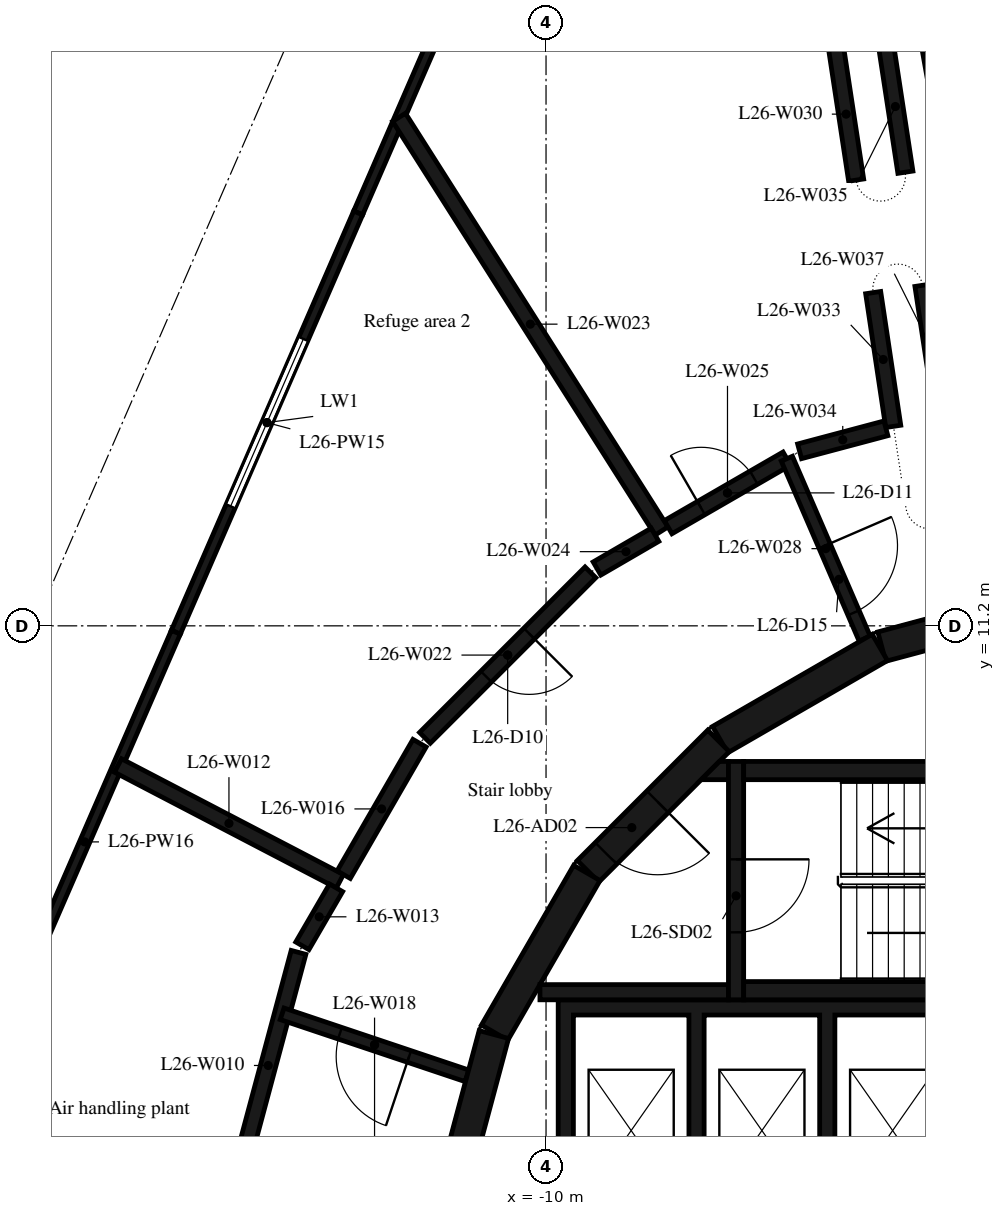
"""IFC4 building model, lengths in metres.
Left out: names, types, materials, properties, quantities, classifications, styles, units other than length and angle.
Written with IfcOpenShell. Run it as: python <this file> out.ifc"""

import sys

from ifc_helpers import new_model, si_unit, direction, frame, frame_2d, origin, place, context, subcontext, project, spatial, polyline, rectangle, outline, extrude, element, fill, save


model = new_model("IFC4")
c1 = context("Model", 3, precision=1e-05, world=origin(), true_north=direction((0.0, 1.0)))
c2 = subcontext(c1, "Body", "Model", "MODEL_VIEW")
j1 = project(units=[si_unit("LENGTHUNIT", "METRE"), si_unit("PLANEANGLEUNIT", "RADIAN")], contexts=[c1])
p1 = place(None, origin())
s1 = spatial("IfcSite", under=j1, at=p1, CompositionType="ELEMENT")
p2 = place(p1, origin())
s2 = spatial("IfcBuilding", under=s1, at=p2, CompositionType="ELEMENT")
p3 = place(p2, frame((0.0, 0.0, 108.2)))
s3 = spatial("IfcBuildingStorey", under=s2, at=p3, CompositionType="ELEMENT", Elevation=108.2)
p4 = place(p3, frame((-10.092, 24.885, 0.0), z_axis=(0.0, 0.0, 1.0), x_axis=(-0.398765291981, -0.917053020229, 0.0)))
e1 = element("IfcWall", 1, at=p4, inside=s3, PredefinedType="STANDARD", context=c2, shape_type="SweptSolid", body=[
    extrude(rectangle(XDim=7.519, YDim=0.16, at=frame_2d((3.76, 0.0))), origin(), (0.0, 0.0, 1.0), 4.75),
])
p5 = place(p4, frame((1.558, 0.0, 1.0)))
e2 = element("IfcOpeningElement", 2, at=p5, cuts=e1, PredefinedType="OPENING", context=c2, shape_type="SweptSolid", body=[
    extrude(rectangle(XDim=3.0, YDim=2.2, at=frame_2d((1.5, 1.1))), frame((0.0, 0.09, 0.0), z_axis=(0.0, -1.0, 0.0), x_axis=(1.0, 0.0, 0.0)), (0.0, 0.0, 1.0), 0.18),
])
p6 = place(p3, frame((-13.09, 17.99, 0.0), z_axis=(0.0, 0.0, 1.0), x_axis=(-0.398749858314, -0.917059731149, 0.0)))
e3 = element("IfcWall", 3, at=p6, inside=s3, PredefinedType="STANDARD", context=c2, shape_type="SweptSolid", body=[
    extrude(rectangle(XDim=7.519, YDim=0.16, at=frame_2d((3.759, 0.0))), origin(), (0.0, 0.0, 1.0), 4.75),
])
p7 = place(p6, frame((2.26, 0.0, 1.0)))
e4 = element("IfcOpeningElement", 4, at=p7, cuts=e3, PredefinedType="OPENING", context=c2, shape_type="SweptSolid", body=[
    extrude(rectangle(XDim=3.0, YDim=2.2, at=frame_2d((1.5, 1.1))), frame((0.0, 0.09, 0.0), z_axis=(0.0, -1.0, 0.0), x_axis=(1.0, 0.0, 0.0)), (0.0, 0.0, 1.0), 0.18),
])
p8 = place(p3, frame((-16.088, 11.095, 0.0), z_axis=(0.0, 0.0, 1.0), x_axis=(-0.398737984544, -0.917064893932, 0.0)))
e5 = element("IfcWall", 5, at=p8, inside=s3, PredefinedType="STANDARD", context=c2, shape_type="SweptSolid", body=[
    extrude(rectangle(XDim=7.519, YDim=0.16, at=frame_2d((3.759, 0.0))), origin(), (0.0, 0.0, 1.0), 4.75),
])
for number, where, z_axis, x_axis in (
    (6, (-1.55, 11.643, 0.0), (0.0, 0.0, 1.0), (-0.966, -0.259, 0.0)),
    (7, (-4.51, 10.845, 0.0), (0.0, 0.0, 1.0), (-0.866, -0.5, 0.0)),
):
    element("IfcWall", number, at=place(p3, frame(where, z_axis=z_axis, x_axis=x_axis)), inside=s3, PredefinedType="SHEAR", context=c2, shape_type="SweptSolid", body=[
        extrude(rectangle(XDim=3.033, YDim=0.5, at=frame_2d((1.516, 0.0))), origin(), (0.0, 0.0, 1.0), 4.75),
    ])
p9 = place(p3, frame((-7.164, 9.308, 0.0), z_axis=(0.0, 0.0, 1.0), x_axis=(-0.707106781187, -0.707106781187, 0.0)))
e8 = element("IfcWall", 8, at=p9, inside=s3, PredefinedType="SHEAR", context=c2, shape_type="SweptSolid", body=[
    extrude(rectangle(XDim=3.032, YDim=0.5, at=frame_2d((1.516, 0.0))), origin(), (0.0, 0.0, 1.0), 4.75),
])
p10 = place(p9, frame((1.416, 0.0, 0.0)))
e9 = element("IfcOpeningElement", 9, at=p10, cuts=e8, PredefinedType="OPENING", context=c2, shape_type="SweptSolid", body=[
    extrude(rectangle(XDim=1.2, YDim=2.1, at=frame_2d((0.6, 1.05))), frame((0.0, 0.26, 0.0), z_axis=(0.0, -1.0, 0.0), x_axis=(1.0, 0.0, 0.0)), (0.0, 0.0, 1.0), 0.52),
])
for number, where, z_axis, x_axis in (
    (10, (-9.329, 7.137, 0.0), (0.0, 0.0, 1.0), (-0.5, -0.866, 0.0)),
    (11, (-10.858, 4.479, 0.0), (0.0, 0.0, 1.0), (-0.259, -0.966, 0.0)),
):
    element("IfcWall", number, at=place(p3, frame(where, z_axis=z_axis, x_axis=x_axis)), inside=s3, PredefinedType="SHEAR", context=c2, shape_type="SweptSolid", body=[
        extrude(rectangle(XDim=3.033, YDim=0.5, at=frame_2d((1.516, 0.0))), origin(), (0.0, 0.0, 1.0), 4.75),
    ])
for number, where, z_axis, x_axis in (
    (12, (-6.75, 5.2, 0.0), (0.0, 0.0, 1.0), (1.0, 0.0, 0.0)),
    (13, (-6.75, 8.82, 0.0), (0.0, 0.0, 1.0), (1.0, 0.0, 0.0)),
):
    element("IfcWall", number, at=place(p3, frame(where, z_axis=z_axis, x_axis=x_axis)), inside=s3, PredefinedType="SHEAR", context=c2, shape_type="SweptSolid", body=[
        extrude(rectangle(XDim=6.75, YDim=0.3, at=frame_2d((3.375, 0.0))), origin(), (0.0, 0.0, 1.0), 4.75),
    ])
p11 = place(p3, frame((-6.875, 8.97, 0.0), z_axis=(0.0, 0.0, 1.0), x_axis=(0.0, -1.0, 0.0)))
e14 = element("IfcWall", 14, at=p11, inside=s3, PredefinedType="SHEAR", context=c2, shape_type="SweptSolid", body=[
    extrude(rectangle(XDim=3.92, YDim=0.25, at=frame_2d((1.96, 0.0))), origin(), (0.0, 0.0, 1.0), 4.75),
])
p12 = place(p11, frame((1.61, 0.0, 0.0)))
e15 = element("IfcOpeningElement", 15, at=p12, cuts=e14, PredefinedType="OPENING", context=c2, shape_type="SweptSolid", body=[
    extrude(rectangle(XDim=1.2, YDim=2.1, at=frame_2d((0.6, 1.05))), frame((0.0, 0.135, 0.0), z_axis=(0.0, -1.0, 0.0), x_axis=(1.0, 0.0, 0.0)), (0.0, 0.0, 1.0), 0.27),
])
p13 = place(p3, frame((-7.0, 5.175, 0.0), z_axis=(0.0, 0.0, 1.0), x_axis=(-1.0, 0.0, 0.0)))
e16 = element("IfcWall", 16, at=p13, inside=s3, PredefinedType="SHEAR", context=c2, shape_type="SweptSolid", body=[
    extrude(rectangle(XDim=3.1, YDim=0.25, at=frame_2d((1.55, 0.0))), origin(), (0.0, 0.0, 1.0), 4.75),
])
p14 = place(p3, origin())
e17 = element("IfcWall", 17, at=p14, inside=s3, PredefinedType="SHEAR", context=c2, shape_type="SweptSolid", body=[
    extrude(outline(polyline([(-7.148, 8.97), (-7.0, 8.97), (-7.0, 8.67), (-7.448, 8.67), (-7.148, 8.97)])), origin(), (0.0, 0.0, 1.0), 4.75),
])
p15 = place(p3, origin())
e18 = element("IfcWall", 18, at=p15, inside=s3, PredefinedType="SHEAR", context=c2, shape_type="SweptSolid", body=[
    extrude(outline(polyline([(-9.55, 4.8), (-7.65, 4.8), (-7.65, 1.9), (-7.4, 1.9), (-7.4, 4.8), (-5.5, 4.8), (-5.5, 1.9), (-5.25, 1.9), (-5.25, 4.8), (-3.35, 4.8), (-3.35, 1.9), (-3.1, 1.9), (-3.1, 4.8), (-1.2, 4.8), (-1.2, 1.9), (-0.95, 1.9), (-0.95, 4.8), (3.1, 4.8), (3.1, 1.9), (3.35, 1.9), (3.35, 4.8), (5.25, 4.8), (5.25, 1.9), (5.5, 1.9), (5.5, 4.8), (7.4, 4.8), (7.4, 1.9), (7.65, 1.9), (7.65, 4.8), (9.55, 4.8), (9.55, 1.9), (9.8, 1.9), (9.8, 4.8), (9.8, 5.05), (-9.8, 5.05), (-9.8, 4.8), (-9.8, 1.9), (-9.55, 1.9), (-9.55, 4.8)])), origin(), (0.0, 0.0, 1.0), 4.75),
])
p16 = place(p3, frame((-14.07, 5.83, 0.0), z_axis=(0.0, 0.0, 1.0), x_axis=(-0.259059323171, -0.965861411942, 0.0)))
e19 = element("IfcWall", 19, at=p16, inside=s3, PredefinedType="PARTITIONING", context=c2, shape_type="SweptSolid", body=[
    extrude(rectangle(XDim=3.851, YDim=0.25, at=frame_2d((1.925, 0.0))), origin(), (0.0, 0.0, 1.0), 4.75),
])
p17 = place(p3, frame((-13.39, 7.0, 0.0), z_axis=(0.0, 0.0, 1.0), x_axis=(-0.886668392091, 0.462405841731, 0.0)))
e20 = element("IfcWall", 20, at=p17, inside=s3, PredefinedType="PARTITIONING", context=c2, shape_type="SweptSolid", body=[
    extrude(rectangle(XDim=4.115, YDim=0.25, at=frame_2d((2.058, 0.0))), origin(), (0.0, 0.0, 1.0), 4.75),
])
p18 = place(p3, frame((-13.453, 6.892, 0.0), z_axis=(0.0, 0.0, 1.0), x_axis=(-0.502370413152, -0.864652512857, 0.0)))
e21 = element("IfcWall", 21, at=p18, inside=s3, PredefinedType="PARTITIONING", context=c2, shape_type="SweptSolid", body=[
    extrude(rectangle(XDim=1.103, YDim=0.25, at=frame_2d((0.552, 0.0))), origin(), (0.0, 0.0, 1.0), 4.75),
])
p19 = place(p3, frame((-12.08, 9.27, 0.0), z_axis=(0.0, 0.0, 1.0), x_axis=(-0.499821239653, -0.866128586522, 0.0)))
e22 = element("IfcWall", 22, at=p19, inside=s3, PredefinedType="PARTITIONING", context=c2, shape_type="SweptSolid", body=[
    extrude(rectangle(XDim=2.496, YDim=0.25, at=frame_2d((1.248, 0.0))), origin(), (0.0, 0.0, 1.0), 4.75),
])
p20 = place(p3, frame((-11.3, 3.8, 0.0), z_axis=(0.0, 0.0, 1.0), x_axis=(-0.94805712629, 0.318100118345, 0.0)))
e23 = element("IfcWall", 23, at=p20, inside=s3, PredefinedType="PARTITIONING", context=c2, shape_type="SweptSolid", body=[
    extrude(rectangle(XDim=3.207, YDim=0.2, at=frame_2d((1.603, 0.0))), origin(), (0.0, 0.0, 1.0), 4.75),
])
p21 = place(p20, frame((1.003, 0.0, 0.0)))
e24 = element("IfcOpeningElement", 24, at=p21, cuts=e23, PredefinedType="OPENING", context=c2, shape_type="SweptSolid", body=[
    extrude(rectangle(XDim=1.2, YDim=2.1, at=frame_2d((0.6, 1.05))), frame((0.0, 0.11, 0.0), z_axis=(0.0, -1.0, 0.0), x_axis=(1.0, 0.0, 0.0)), (0.0, 0.0, 1.0), 0.22),
])
p22 = place(p3, frame((-9.27, 12.08, 0.0), z_axis=(0.0, 0.0, 1.0), x_axis=(-0.707106781187, -0.707106781187, 0.0)))
e25 = element("IfcWall", 25, at=p22, inside=s3, PredefinedType="PARTITIONING", context=c2, shape_type="SweptSolid", body=[
    extrude(rectangle(XDim=3.849, YDim=0.25, at=frame_2d((1.925, 0.0))), origin(), (0.0, 0.0, 1.0), 4.75),
])
p23 = place(p22, frame((1.425, 0.0, 0.0)))
e26 = element("IfcOpeningElement", 26, at=p23, cuts=e25, PredefinedType="OPENING", context=c2, shape_type="SweptSolid", body=[
    extrude(rectangle(XDim=1.0, YDim=2.1, at=frame_2d((0.5, 1.05))), frame((0.0, 0.135, 0.0), z_axis=(0.0, -1.0, 0.0), x_axis=(1.0, 0.0, 0.0)), (0.0, 0.0, 1.0), 0.27),
])
p24 = place(p3, frame((-8.1, 12.76, 0.0), z_axis=(0.0, 0.0, 1.0), x_axis=(-0.535839810612, 0.844319665389, 0.0)))
e27 = element("IfcWall", 27, at=p24, inside=s3, PredefinedType="PARTITIONING", context=c2, shape_type="SweptSolid", body=[
    extrude(rectangle(XDim=8.057, YDim=0.25, at=frame_2d((4.028, 0.0))), origin(), (0.0, 0.0, 1.0), 4.75),
])
p25 = place(p3, frame((-8.208, 12.697, 0.0), z_axis=(0.0, 0.0, 1.0), x_axis=(-0.86455637663, -0.502535841138, 0.0)))
e28 = element("IfcWall", 28, at=p25, inside=s3, PredefinedType="PARTITIONING", context=c2, shape_type="SweptSolid", body=[
    extrude(rectangle(XDim=1.103, YDim=0.25, at=frame_2d((0.552, 0.0))), origin(), (0.0, 0.0, 1.0), 4.75),
])
p26 = place(p3, frame((-7.992, 12.823, 0.0), z_axis=(0.0, 0.0, 1.0), x_axis=(0.865900522319, 0.500216238688, 0.0)))
e29 = element("IfcWall", 29, at=p26, inside=s3, PredefinedType="PARTITIONING", context=c2, shape_type="SweptSolid", body=[
    extrude(rectangle(XDim=2.254, YDim=0.25, at=frame_2d((1.127, 0.0))), origin(), (0.0, 0.0, 1.0), 4.75),
])
p27 = place(p26, frame((0.627, 0.0, 0.0)))
e30 = element("IfcOpeningElement", 30, at=p27, cuts=e29, PredefinedType="OPENING", context=c2, shape_type="SweptSolid", body=[
    extrude(rectangle(XDim=1.0, YDim=2.1, at=frame_2d((0.5, 1.05))), frame((0.0, 0.135, 0.0), z_axis=(0.0, -1.0, 0.0), x_axis=(1.0, 0.0, 0.0)), (0.0, 0.0, 1.0), 0.27),
])
p28 = place(p3, frame((-6.04, 13.949, 0.0), z_axis=(0.0, 0.0, 1.0), x_axis=(0.396905977672, -0.917859272922, 0.0)))
e31 = element("IfcWall", 31, at=p28, inside=s3, PredefinedType="PARTITIONING", context=c2, shape_type="SweptSolid", body=[
    extrude(rectangle(XDim=3.224, YDim=0.2, at=frame_2d((1.612, 0.0))), origin(), (0.0, 0.0, 1.0), 4.75),
])
p29 = place(p28, frame((1.562, 0.0, 0.0)))
e32 = element("IfcOpeningElement", 32, at=p29, cuts=e31, PredefinedType="OPENING", context=c2, shape_type="SweptSolid", body=[
    extrude(rectangle(XDim=1.2, YDim=2.1, at=frame_2d((0.6, 1.05))), frame((0.0, 0.11, 0.0), z_axis=(0.0, -1.0, 0.0), x_axis=(1.0, 0.0, 0.0)), (0.0, 0.0, 1.0), 0.22),
])
p30 = place(p3, frame((-5.23, 20.7, 0.0), z_axis=(0.0, 0.0, 1.0), x_axis=(0.150385276272, -0.988627467088, 0.0)))
e33 = element("IfcWall", 33, at=p30, inside=s3, PredefinedType="PARTITIONING", context=c2, shape_type="SweptSolid", body=[
    extrude(rectangle(XDim=2.195, YDim=0.25, at=frame_2d((1.097, 0.0))), origin(), (0.0, 0.0, 1.0), 4.75),
])
p31 = place(p3, frame((-4.62, 16.68, 0.0), z_axis=(0.0, 0.0, 1.0), x_axis=(0.148378019052, -0.98893071722, 0.0)))
e34 = element("IfcWall", 34, at=p31, inside=s3, PredefinedType="PARTITIONING", context=c2, shape_type="SweptSolid", body=[
    extrude(rectangle(XDim=2.225, YDim=0.25, at=frame_2d((1.112, 0.0))), origin(), (0.0, 0.0, 1.0), 4.75),
])
p32 = place(p3, frame((-4.411, 14.448, 0.0), z_axis=(0.0, 0.0, 1.0), x_axis=(-0.966364499744, -0.257176308464, 0.0)))
e35 = element("IfcWall", 35, at=p32, inside=s3, PredefinedType="PARTITIONING", context=c2, shape_type="SweptSolid", body=[
    extrude(rectangle(XDim=1.469, YDim=0.25, at=frame_2d((0.734, 0.0))), origin(), (0.0, 0.0, 1.0), 4.75),
])
p33 = place(p3, frame((-4.09, 18.66, 0.0), z_axis=(0.0, 0.0, 1.0), x_axis=(-0.150940482968, 0.988542852183, 0.0)))
e36 = element("IfcWall", 36, at=p33, inside=s3, PredefinedType="PARTITIONING", context=c2, shape_type="SweptSolid", body=[
    extrude(rectangle(XDim=2.185, YDim=0.25, at=frame_2d((1.093, 0.0))), origin(), (0.0, 0.0, 1.0), 4.75),
])
p34 = place(p3, frame((-3.49, 14.69, 0.0), z_axis=(0.0, 0.0, 1.0), x_axis=(-0.149968031865, 0.98869084623, 0.0)))
e37 = element("IfcWall", 37, at=p34, inside=s3, PredefinedType="PARTITIONING", context=c2, shape_type="SweptSolid", body=[
    extrude(rectangle(XDim=2.134, YDim=0.25, at=frame_2d((1.067, 0.0))), origin(), (0.0, 0.0, 1.0), 4.75),
])
p35 = place(p3, frame((-2.66, 14.92, 0.0), z_axis=(0.0, 0.0, 1.0), x_axis=(-0.175922099098, 0.984404091341, 0.0)))
e38 = element("IfcWall", 38, at=p35, inside=s3, PredefinedType="PARTITIONING", context=c2, shape_type="SweptSolid", body=[
    extrude(rectangle(XDim=6.106, YDim=0.25, at=frame_2d((3.053, 0.0))), origin(), (0.0, 0.0, 1.0), 4.75),
])
p36 = place(p7, origin())
e39 = element("IfcWindow", 39, at=p36, inside=s3, PartitioningType="SINGLE_PANEL", PredefinedType="WINDOW", context=c2, shape_type="SweptSolid", body=[
    extrude(rectangle(XDim=3.0, YDim=2.2, at=frame_2d((1.5, 1.1))), frame((0.0, 0.03, 0.0), z_axis=(0.0, -1.0, 0.0), x_axis=(1.0, 0.0, 0.0)), (0.0, 0.0, 1.0), 0.06),
])
fill(e4, e39)
p37 = place(p12, origin())
e40 = element("IfcDoor", 40, at=p37, inside=s3, OperationType="SINGLE_SWING_LEFT", PredefinedType="DOOR", context=c2, shape_type="SweptSolid", body=[
    extrude(rectangle(XDim=1.2, YDim=2.1, at=frame_2d((0.6, 1.05))), frame((0.0, 0.025, 0.0), z_axis=(0.0, -1.0, 0.0), x_axis=(1.0, 0.0, 0.0)), (0.0, 0.0, 1.0), 0.05),
])
fill(e15, e40)
p38 = place(p10, origin())
e41 = element("IfcDoor", 41, at=p38, inside=s3, OperationType="SINGLE_SWING_RIGHT", PredefinedType="DOOR", context=c2, shape_type="SweptSolid", body=[
    extrude(rectangle(XDim=1.2, YDim=2.1, at=frame_2d((0.6, 1.05))), frame((0.0, 0.025, 0.0), z_axis=(0.0, -1.0, 0.0), x_axis=(1.0, 0.0, 0.0)), (0.0, 0.0, 1.0), 0.05),
])
fill(e9, e41)
p39 = place(p23, origin())
e42 = element("IfcDoor", 42, at=p39, inside=s3, OperationType="SINGLE_SWING_LEFT", PredefinedType="DOOR", context=c2, shape_type="SweptSolid", body=[
    extrude(rectangle(XDim=1.0, YDim=2.1, at=frame_2d((0.5, 1.05))), frame((0.0, 0.025, 0.0), z_axis=(0.0, -1.0, 0.0), x_axis=(1.0, 0.0, 0.0)), (0.0, 0.0, 1.0), 0.05),
])
fill(e26, e42)
p40 = place(p27, origin())
e43 = element("IfcDoor", 43, at=p40, inside=s3, OperationType="SINGLE_SWING_LEFT", PredefinedType="DOOR", context=c2, shape_type="SweptSolid", body=[
    extrude(rectangle(XDim=1.0, YDim=2.1, at=frame_2d((0.5, 1.05))), frame((0.0, 0.025, 0.0), z_axis=(0.0, -1.0, 0.0), x_axis=(1.0, 0.0, 0.0)), (0.0, 0.0, 1.0), 0.05),
])
fill(e30, e43)
p41 = place(p29, origin())
e44 = element("IfcDoor", 44, at=p41, inside=s3, OperationType="SINGLE_SWING_LEFT", PredefinedType="DOOR", context=c2, shape_type="SweptSolid", body=[
    extrude(rectangle(XDim=1.2, YDim=2.1, at=frame_2d((0.6, 1.05))), frame((0.0, 0.025, 0.0), z_axis=(0.0, -1.0, 0.0), x_axis=(1.0, 0.0, 0.0)), (0.0, 0.0, 1.0), 0.05),
])
fill(e32, e44)
p42 = place(p21, origin())
e45 = element("IfcDoor", 45, at=p42, inside=s3, OperationType="SINGLE_SWING_LEFT", PredefinedType="DOOR", context=c2, shape_type="SweptSolid", body=[
    extrude(rectangle(XDim=1.2, YDim=2.1, at=frame_2d((0.6, 1.05))), frame((0.0, 0.025, 0.0), z_axis=(0.0, -1.0, 0.0), x_axis=(1.0, 0.0, 0.0)), (0.0, 0.0, 1.0), 0.05),
])
fill(e24, e45)
save(model, sys.argv[1])
